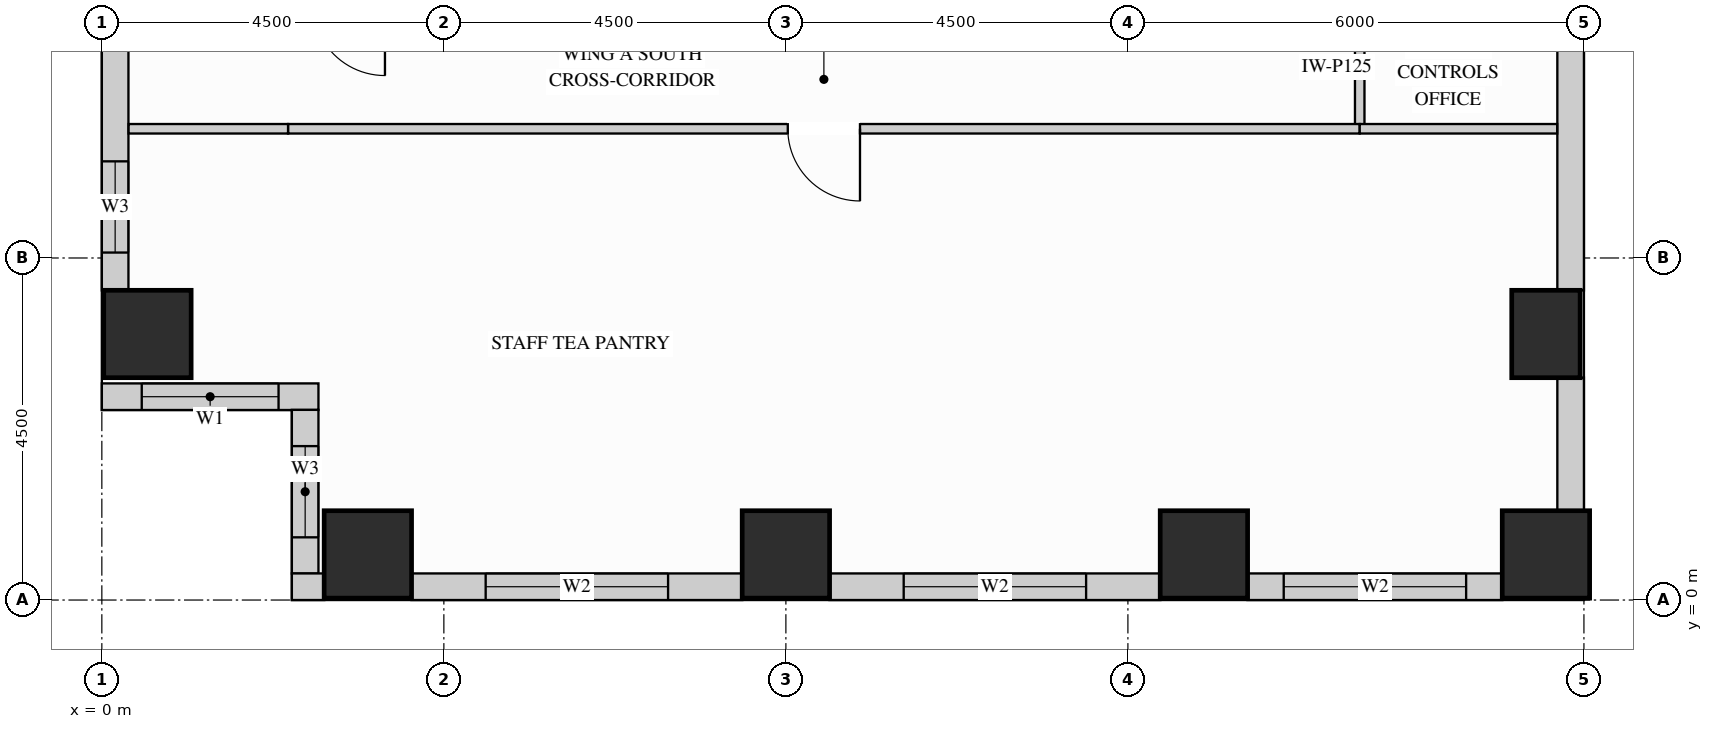
"""IFC4 building model, lengths in metres.
Left out: names, types, materials, properties, quantities, classifications, styles, units other than length and angle.
Written with IfcOpenShell. Run it as: python <this file> out.ifc"""

import sys

from ifc_helpers import new_model, si_unit, direction, frame, frame_2d, origin, origin_2d, place, context, subcontext, project, spatial, rectangle, extrude, source, transform, mapped, element, fill, save


model = new_model("IFC4")
c1 = context("Model", 3, precision=1e-05, world=origin(), true_north=direction((0.0, 1.0)))
c2 = subcontext(c1, "Body", "Model", "MODEL_VIEW")
j1 = project(units=[si_unit("LENGTHUNIT", "METRE"), si_unit("PLANEANGLEUNIT", "RADIAN")], contexts=[c1])
p1 = place(None, origin())
s1 = spatial("IfcSite", under=j1, at=p1, CompositionType="ELEMENT")
p2 = place(p1, origin())
s2 = spatial("IfcBuilding", under=s1, at=p2, CompositionType="ELEMENT")
p3 = place(p2, frame((0.0, 0.0, 109.8)))
s3 = spatial("IfcBuildingStorey", under=s2, at=p3, CompositionType="ELEMENT", Elevation=109.8)
m1 = source(origin(), c2, "Body", "SweptSolid", [
    extrude(rectangle(XDim=0.9, YDim=1.15, at=origin_2d()), origin(), (0.0, 0.0, 1.0), 3.38),
])
p4 = place(p3, frame((19.0, 3.5, 0.0), z_axis=(0.0, 0.0, 1.0), x_axis=(1.0, 0.0, 0.0)))
e1 = element("IfcColumn", 1, at=p4, inside=s3, PredefinedType="COLUMN", context=c2, shape_type="MappedRepresentation", body=[
    mapped(m1, transform((0.0, 0.0, 0.0), x_axis=(1.0, 0.0, 0.0), y_axis=(0.0, 1.0, 0.0), z_axis=(0.0, 0.0, 1.0))),
])
m2 = source(origin(), c2, "Body", "SweptSolid", [
    extrude(rectangle(XDim=1.15, YDim=1.15, at=origin_2d()), origin(), (0.0, 0.0, 1.0), 3.38),
])
for number, where, z_axis, x_axis in (
    (2, (14.5, 0.6, 0.0), (0.0, 0.0, 1.0), (1.0, 0.0, 0.0)),
    (3, (19.0, 0.6, 0.0), (0.0, 0.0, 1.0), (1.0, 0.0, 0.0)),
    (4, (3.5, 0.6, 0.0), (0.0, 0.0, 1.0), (1.0, 0.0, 0.0)),
    (5, (9.0, 0.6, 0.0), (0.0, 0.0, 1.0), (1.0, 0.0, 0.0)),
    (6, (0.6, 3.5, 0.0), (0.0, 0.0, 1.0), (1.0, 0.0, 0.0)),
):
    element("IfcColumn", number, at=place(p3, frame(where, z_axis=z_axis, x_axis=x_axis)), inside=s3, PredefinedType="COLUMN", context=c2, shape_type="MappedRepresentation", body=[
        mapped(m2, transform((0.0, 0.0, 0.0), x_axis=(1.0, 0.0, 0.0), y_axis=(0.0, 1.0, 0.0), z_axis=(0.0, 0.0, 1.0))),
    ])
p5 = place(p3, frame((0.175, 7.927, 0.0), z_axis=(0.0, 0.0, 1.0), x_axis=(0.0, -1.0, 0.0)))
e7 = element("IfcWall", 7, at=p5, inside=s3, PredefinedType="SOLIDWALL", context=c2, shape_type="SweptSolid", body=[
    extrude(rectangle(XDim=3.854, YDim=0.35, at=frame_2d((1.927, 0.0))), origin(), (0.0, 0.0, 1.0), 3.365),
])
p6 = place(p5, frame((2.156, 0.0, 0.78)))
e8 = element("IfcOpeningElement", 8, at=p6, cuts=e7, PredefinedType="OPENING", context=c2, shape_type="SweptSolid", body=[
    extrude(rectangle(XDim=1.2, YDim=2.1, at=frame_2d((0.6, 1.05))), frame((0.0, 0.185, 0.0), z_axis=(0.0, -1.0, 0.0), x_axis=(1.0, 0.0, 0.0)), (0.0, 0.0, 1.0), 0.37),
])
p7 = place(p3, frame((0.0, 2.675, 0.0), z_axis=(0.0, 0.0, 1.0), x_axis=(1.0, 0.0, 0.0)))
e9 = element("IfcWall", 9, at=p7, inside=s3, PredefinedType="SOLIDWALL", context=c2, shape_type="SweptSolid", body=[
    extrude(rectangle(XDim=2.85, YDim=0.35, at=frame_2d((1.425, 0.0))), origin(), (0.0, 0.0, 1.0), 3.365),
])
p8 = place(p7, frame((0.525, 0.0, 0.78)))
e10 = element("IfcOpeningElement", 10, at=p8, cuts=e9, PredefinedType="OPENING", context=c2, shape_type="SweptSolid", body=[
    extrude(rectangle(XDim=1.8, YDim=2.1, at=frame_2d((0.9, 1.05))), frame((0.0, 0.185, 0.0), z_axis=(0.0, -1.0, 0.0), x_axis=(1.0, 0.0, 0.0)), (0.0, 0.0, 1.0), 0.37),
])
p9 = place(p3, frame((2.675, 2.502, 0.0), z_axis=(0.0, 0.0, 1.0), x_axis=(0.0, -1.0, 0.0)))
e11 = element("IfcWall", 11, at=p9, inside=s3, PredefinedType="SOLIDWALL", context=c2, shape_type="SweptSolid", body=[
    extrude(rectangle(XDim=2.154, YDim=0.35, at=frame_2d((1.077, 0.0))), origin(), (0.0, 0.0, 1.0), 3.365),
])
p10 = place(p9, frame((0.477, 0.0, 0.78)))
e12 = element("IfcOpeningElement", 12, at=p10, cuts=e11, PredefinedType="OPENING", context=c2, shape_type="SweptSolid", body=[
    extrude(rectangle(XDim=1.2, YDim=2.1, at=frame_2d((0.6, 1.05))), frame((0.0, 0.185, 0.0), z_axis=(0.0, -1.0, 0.0), x_axis=(1.0, 0.0, 0.0)), (0.0, 0.0, 1.0), 0.37),
])
m3 = source(origin(), c2, "Body", "SweptSolid", [
    extrude(rectangle(XDim=0.427, YDim=0.35, at=frame_2d((0.213, 0.0))), origin(), (0.0, 0.0, 1.0), 3.365),
])
p11 = place(p3, frame((2.5, 0.175, 0.0), z_axis=(0.0, 0.0, 1.0), x_axis=(1.0, 0.0, 0.0)))
e13 = element("IfcWall", 13, at=p11, inside=s3, PredefinedType="SOLIDWALL", context=c2, shape_type="MappedRepresentation", body=[
    mapped(m3, transform((0.0, 0.0, 0.0), x_axis=(1.0, 0.0, 0.0), y_axis=(0.0, 1.0, 0.0), z_axis=(0.0, 0.0, 1.0))),
])
p12 = place(p3, frame((4.073, 0.175, 0.0), z_axis=(0.0, 0.0, 1.0), x_axis=(1.0, 0.0, 0.0)))
e14 = element("IfcWall", 14, at=p12, inside=s3, PredefinedType="SOLIDWALL", context=c2, shape_type="SweptSolid", body=[
    extrude(rectangle(XDim=4.354, YDim=0.35, at=frame_2d((2.177, 0.0))), origin(), (0.0, 0.0, 1.0), 3.365),
])
p13 = place(p12, frame((0.977, 0.0, 0.78)))
e15 = element("IfcOpeningElement", 15, at=p13, cuts=e14, PredefinedType="OPENING", context=c2, shape_type="SweptSolid", body=[
    extrude(rectangle(XDim=2.4, YDim=2.1, at=frame_2d((1.2, 1.05))), frame((0.0, 0.185, 0.0), z_axis=(0.0, -1.0, 0.0), x_axis=(1.0, 0.0, 0.0)), (0.0, 0.0, 1.0), 0.37),
])
p14 = place(p3, frame((9.573, 0.175, 0.0), z_axis=(0.0, 0.0, 1.0), x_axis=(1.0, 0.0, 0.0)))
e16 = element("IfcWall", 16, at=p14, inside=s3, PredefinedType="SOLIDWALL", context=c2, shape_type="SweptSolid", body=[
    extrude(rectangle(XDim=4.354, YDim=0.35, at=frame_2d((2.177, 0.0))), origin(), (0.0, 0.0, 1.0), 3.365),
])
p15 = place(p14, frame((0.977, 0.0, 0.78)))
e17 = element("IfcOpeningElement", 17, at=p15, cuts=e16, PredefinedType="OPENING", context=c2, shape_type="SweptSolid", body=[
    extrude(rectangle(XDim=2.4, YDim=2.1, at=frame_2d((1.2, 1.05))), frame((0.0, 0.185, 0.0), z_axis=(0.0, -1.0, 0.0), x_axis=(1.0, 0.0, 0.0)), (0.0, 0.0, 1.0), 0.37),
])
p16 = place(p3, frame((15.073, 0.175, 0.0), z_axis=(0.0, 0.0, 1.0), x_axis=(1.0, 0.0, 0.0)))
e18 = element("IfcWall", 18, at=p16, inside=s3, PredefinedType="SOLIDWALL", context=c2, shape_type="SweptSolid", body=[
    extrude(rectangle(XDim=3.354, YDim=0.35, at=frame_2d((1.677, 0.0))), origin(), (0.0, 0.0, 1.0), 3.365),
])
p17 = place(p16, frame((0.477, 0.0, 0.78)))
e19 = element("IfcOpeningElement", 19, at=p17, cuts=e18, PredefinedType="OPENING", context=c2, shape_type="SweptSolid", body=[
    extrude(rectangle(XDim=2.4, YDim=2.1, at=frame_2d((1.2, 1.05))), frame((0.0, 0.185, 0.0), z_axis=(0.0, -1.0, 0.0), x_axis=(1.0, 0.0, 0.0)), (0.0, 0.0, 1.0), 0.37),
])
m4 = source(origin(), c2, "Body", "SweptSolid", [
    extrude(rectangle(XDim=1.754, YDim=0.35, at=frame_2d((0.877, 0.0))), origin(), (0.0, 0.0, 1.0), 2.519),
])
p18 = place(p3, frame((19.325, 1.173, 0.0), z_axis=(0.0, 0.0, 1.0), x_axis=(0.0, 1.0, 0.0)))
e20 = element("IfcWall", 20, at=p18, inside=s3, PredefinedType="SOLIDWALL", context=c2, shape_type="MappedRepresentation", body=[
    mapped(m4, transform((0.0, 0.0, 0.0), x_axis=(1.0, 0.0, 0.0), y_axis=(0.0, 1.0, 0.0), z_axis=(0.0, 0.0, 1.0))),
])
m5 = source(origin(), c2, "Body", "SweptSolid", [
    extrude(rectangle(XDim=3.854, YDim=0.35, at=frame_2d((1.927, 0.0))), origin(), (0.0, 0.0, 1.0), 2.519),
])
p19 = place(p3, frame((19.325, 4.073, 0.0), z_axis=(0.0, 0.0, 1.0), x_axis=(0.0, 1.0, 0.0)))
e21 = element("IfcWall", 21, at=p19, inside=s3, PredefinedType="SOLIDWALL", context=c2, shape_type="MappedRepresentation", body=[
    mapped(m5, transform((0.0, 0.0, 0.0), x_axis=(1.0, 0.0, 0.0), y_axis=(0.0, 1.0, 0.0), z_axis=(0.0, 0.0, 1.0))),
])
p20 = place(p3, frame((16.55, 6.2, 0.0), z_axis=(0.0, 0.0, 1.0), x_axis=(0.0, 1.0, 0.0)))
e22 = element("IfcWall", 22, at=p20, inside=s3, PredefinedType="PARTITIONING", context=c2, shape_type="SweptSolid", body=[
    extrude(rectangle(XDim=4.4, YDim=0.125, at=frame_2d((2.2, 0.0))), origin(), (0.0, 0.0, 1.0), 3.365),
])
p21 = place(p20, frame((1.725, 0.0, 0.0)))
e23 = element("IfcOpeningElement", 23, at=p21, cuts=e22, PredefinedType="OPENING", context=c2, shape_type="SweptSolid", body=[
    extrude(rectangle(XDim=0.95, YDim=2.15, at=frame_2d((0.475, 1.075))), frame((0.0, 0.073, 0.0), z_axis=(0.0, -1.0, 0.0), x_axis=(1.0, 0.0, 0.0)), (0.0, 0.0, 1.0), 0.145),
])
p22 = place(p3, frame((2.45, 6.2, 0.0), z_axis=(0.0, 0.0, 1.0), x_axis=(1.0, 0.0, 0.0)))
e24 = element("IfcWall", 24, at=p22, inside=s3, PredefinedType="PARTITIONING", context=c2, shape_type="SweptSolid", body=[
    extrude(rectangle(XDim=14.1, YDim=0.125, at=frame_2d((7.05, 0.0))), origin(), (0.0, 0.0, 1.0), 2.828),
])
p23 = place(p22, frame((6.575, 0.0, 0.0)))
e25 = element("IfcOpeningElement", 25, at=p23, cuts=e24, PredefinedType="OPENING", context=c2, shape_type="SweptSolid", body=[
    extrude(rectangle(XDim=0.95, YDim=2.15, at=frame_2d((0.475, 1.075))), frame((0.0, 0.073, 0.0), z_axis=(0.0, -1.0, 0.0), x_axis=(1.0, 0.0, 0.0)), (0.0, 0.0, 1.0), 0.145),
])
m6 = source(origin(), c2, "Body", "SweptSolid", [
    extrude(rectangle(XDim=2.098, YDim=0.125, at=frame_2d((1.049, 0.0))), origin(), (0.0, 0.0, 1.0), 2.828),
])
p24 = place(p3, frame((0.352, 6.2, 0.0), z_axis=(0.0, 0.0, 1.0), x_axis=(1.0, 0.0, 0.0)))
e26 = element("IfcWall", 26, at=p24, inside=s3, PredefinedType="PARTITIONING", context=c2, shape_type="MappedRepresentation", body=[
    mapped(m6, transform((0.0, 0.0, 0.0), x_axis=(1.0, 0.0, 0.0), y_axis=(0.0, 1.0, 0.0), z_axis=(0.0, 0.0, 1.0))),
])
m7 = source(origin(), c2, "Body", "SweptSolid", [
    extrude(rectangle(XDim=2.598, YDim=0.125, at=frame_2d((1.299, 0.0))), origin(), (0.0, 0.0, 1.0), 2.828),
])
p25 = place(p3, frame((16.55, 6.2, 0.0), z_axis=(0.0, 0.0, 1.0), x_axis=(1.0, 0.0, 0.0)))
e27 = element("IfcWall", 27, at=p25, inside=s3, PredefinedType="PARTITIONING", context=c2, shape_type="MappedRepresentation", body=[
    mapped(m7, transform((0.0, 0.0, 0.0), x_axis=(1.0, 0.0, 0.0), y_axis=(0.0, 1.0, 0.0), z_axis=(0.0, 0.0, 1.0))),
])
m8 = source(origin(), c2, "Body", "SweptSolid", [
    extrude(rectangle(XDim=0.95, YDim=2.15, at=frame_2d((0.475, 1.075))), frame((0.0, 0.025, 0.0), z_axis=(0.0, -1.0, 0.0), x_axis=(1.0, 0.0, 0.0)), (0.0, 0.0, 1.0), 0.05),
])
p26 = place(p23, origin())
e28 = element("IfcDoor", 28, at=p26, inside=s3, OperationType="SINGLE_SWING_RIGHT", PredefinedType="DOOR", context=c2, shape_type="MappedRepresentation", body=[
    mapped(m8, transform((0.0, 0.0, 0.0), x_axis=(1.0, 0.0, 0.0), y_axis=(0.0, 1.0, 0.0), z_axis=(0.0, 0.0, 1.0))),
])
fill(e25, e28)
m9 = source(origin(), c2, "Body", "SweptSolid", [
    extrude(rectangle(XDim=1.8, YDim=2.1, at=frame_2d((0.9, 1.05))), frame((0.0, 0.03, 0.0), z_axis=(0.0, -1.0, 0.0), x_axis=(1.0, 0.0, 0.0)), (0.0, 0.0, 1.0), 0.06),
])
p27 = place(p8, origin())
e29 = element("IfcWindow", 29, at=p27, inside=s3, PartitioningType="SINGLE_PANEL", PredefinedType="WINDOW", context=c2, shape_type="MappedRepresentation", body=[
    mapped(m9, transform((0.0, 0.0, 0.0), x_axis=(1.0, 0.0, 0.0), y_axis=(0.0, 1.0, 0.0), z_axis=(0.0, 0.0, 1.0))),
])
fill(e10, e29)
m10 = source(origin(), c2, "Body", "SweptSolid", [
    extrude(rectangle(XDim=2.4, YDim=2.1, at=frame_2d((1.2, 1.05))), frame((0.0, 0.03, 0.0), z_axis=(0.0, -1.0, 0.0), x_axis=(1.0, 0.0, 0.0)), (0.0, 0.0, 1.0), 0.06),
])
p28 = place(p13, origin())
e30 = element("IfcWindow", 30, at=p28, inside=s3, PartitioningType="SINGLE_PANEL", PredefinedType="WINDOW", context=c2, shape_type="MappedRepresentation", body=[
    mapped(m10, transform((0.0, 0.0, 0.0), x_axis=(1.0, 0.0, 0.0), y_axis=(0.0, 1.0, 0.0), z_axis=(0.0, 0.0, 1.0))),
])
fill(e15, e30)
p29 = place(p15, origin())
e31 = element("IfcWindow", 31, at=p29, inside=s3, PartitioningType="SINGLE_PANEL", PredefinedType="WINDOW", context=c2, shape_type="MappedRepresentation", body=[
    mapped(m10, transform((0.0, 0.0, 0.0), x_axis=(1.0, 0.0, 0.0), y_axis=(0.0, 1.0, 0.0), z_axis=(0.0, 0.0, 1.0))),
])
fill(e17, e31)
p30 = place(p17, origin())
e32 = element("IfcWindow", 32, at=p30, inside=s3, PartitioningType="SINGLE_PANEL", PredefinedType="WINDOW", context=c2, shape_type="MappedRepresentation", body=[
    mapped(m10, transform((0.0, 0.0, 0.0), x_axis=(1.0, 0.0, 0.0), y_axis=(0.0, 1.0, 0.0), z_axis=(0.0, 0.0, 1.0))),
])
fill(e19, e32)
m11 = source(origin(), c2, "Body", "SweptSolid", [
    extrude(rectangle(XDim=1.2, YDim=2.1, at=frame_2d((0.6, 1.05))), frame((0.0, 0.03, 0.0), z_axis=(0.0, -1.0, 0.0), x_axis=(1.0, 0.0, 0.0)), (0.0, 0.0, 1.0), 0.06),
])
p31 = place(p6, origin())
e33 = element("IfcWindow", 33, at=p31, inside=s3, PartitioningType="SINGLE_PANEL", PredefinedType="WINDOW", context=c2, shape_type="MappedRepresentation", body=[
    mapped(m11, transform((0.0, 0.0, 0.0), x_axis=(1.0, 0.0, 0.0), y_axis=(0.0, 1.0, 0.0), z_axis=(0.0, 0.0, 1.0))),
])
fill(e8, e33)
p32 = place(p10, origin())
e34 = element("IfcWindow", 34, at=p32, inside=s3, PartitioningType="SINGLE_PANEL", PredefinedType="WINDOW", context=c2, shape_type="MappedRepresentation", body=[
    mapped(m11, transform((0.0, 0.0, 0.0), x_axis=(1.0, 0.0, 0.0), y_axis=(0.0, 1.0, 0.0), z_axis=(0.0, 0.0, 1.0))),
])
fill(e12, e34)
save(model, sys.argv[1])
